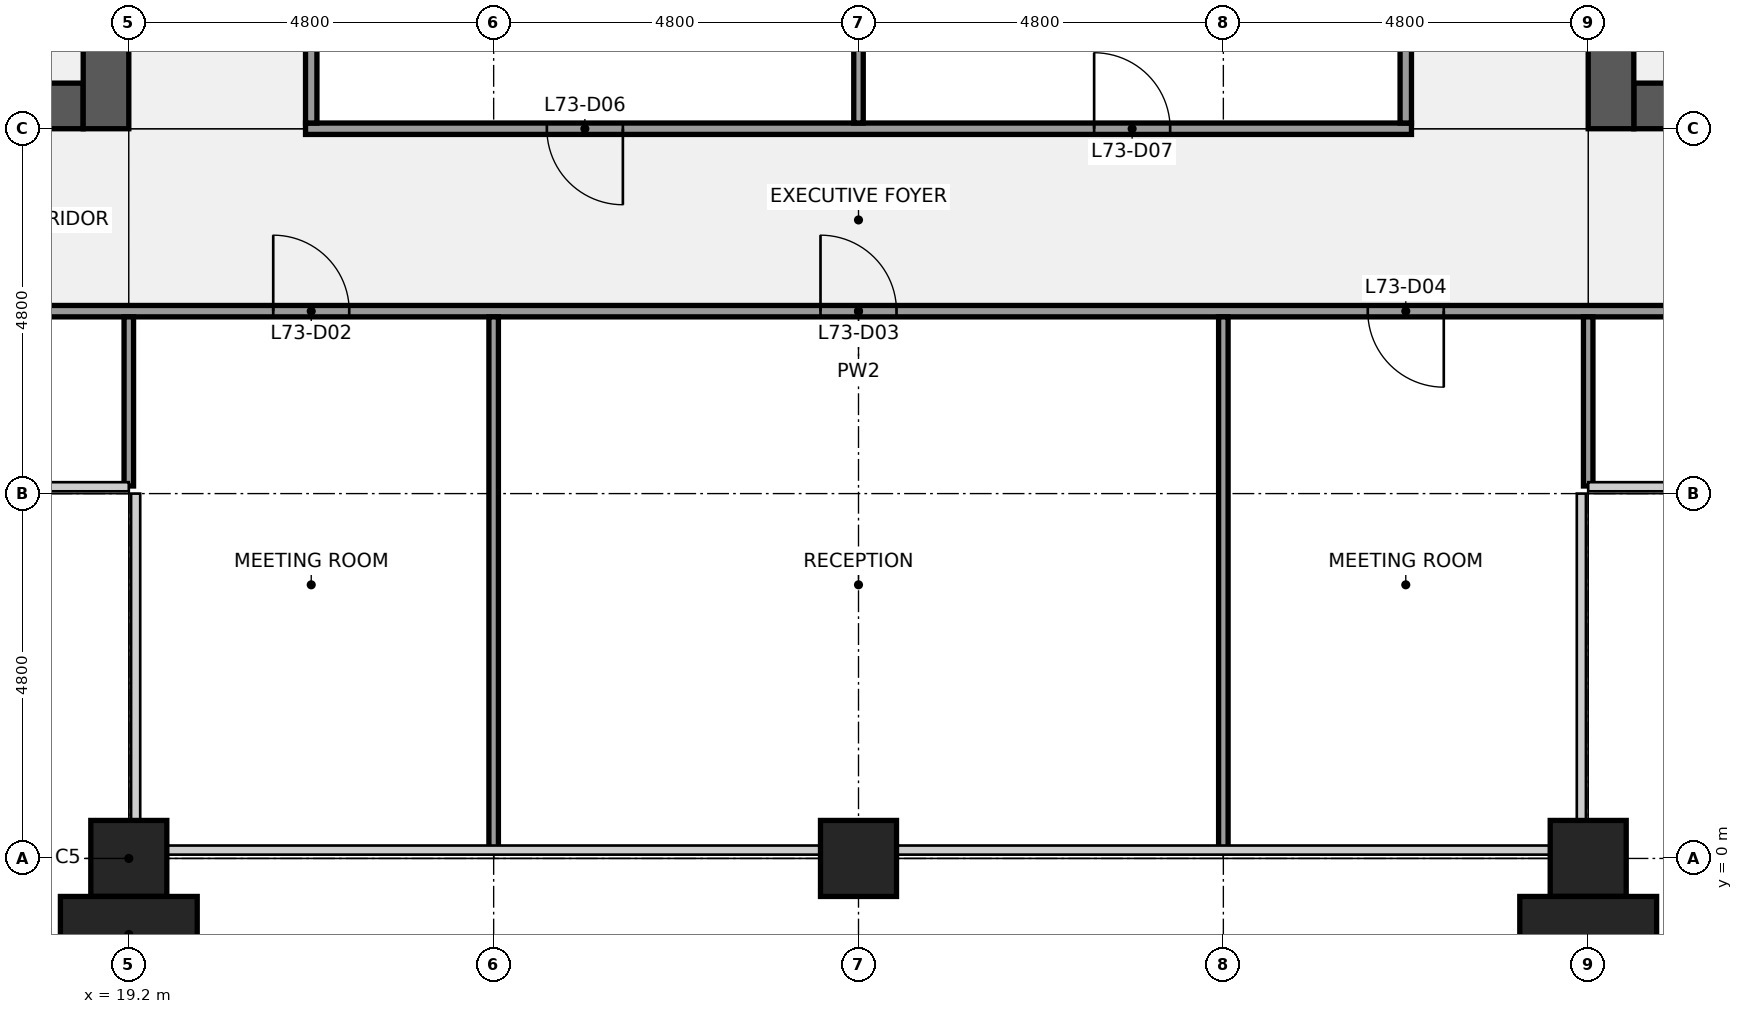
"""IFC4 building model, lengths in metres.
Left out: names, types, materials, properties, quantities, classifications, styles, units other than length and angle.
Written with IfcOpenShell. Run it as: python <this file> out.ifc"""

import sys

from ifc_helpers import new_model, si_unit, direction, frame, frame_2d, origin, origin_2d, place, context, subcontext, project, spatial, rectangle, extrude, element, fill, save


model = new_model("IFC4")
c1 = context("Model", 3, precision=1e-05, world=origin(), true_north=direction((0.0, 1.0)))
c2 = subcontext(c1, "Body", "Model", "MODEL_VIEW")
j1 = project(units=[si_unit("LENGTHUNIT", "METRE"), si_unit("PLANEANGLEUNIT", "RADIAN")], contexts=[c1])
p1 = place(None, origin())
s1 = spatial("IfcSite", under=j1, at=p1, CompositionType="ELEMENT")
p2 = place(p1, origin())
s2 = spatial("IfcBuilding", under=s1, at=p2, CompositionType="ELEMENT")
p3 = place(p2, frame((0.0, 0.0, 330.3)))
s3 = spatial("IfcBuildingStorey", under=s2, at=p3, CompositionType="ELEMENT", Elevation=330.3)
for number, where, z_axis, x_axis in (
    (1, (19.2, 0.0, 0.0), (0.0, 0.0, 1.0), (1.0, 0.0, 0.0)),
    (2, (28.8, 0.0, 0.0), (0.0, 0.0, 1.0), (1.0, 0.0, 0.0)),
    (3, (38.4, 0.0, 0.0), (0.0, 0.0, 1.0), (1.0, 0.0, 0.0)),
):
    element("IfcColumn", number, at=place(p3, frame(where, z_axis=z_axis, x_axis=x_axis)), inside=s3, PredefinedType="COLUMN", context=c2, shape_type="SweptSolid", body=[
        extrude(rectangle(XDim=1.0, YDim=1.0, at=origin_2d()), origin(), (0.0, 0.0, 1.0), 4.0),
    ])
p4 = place(p3, frame((18.6, 9.9, 0.0), z_axis=(0.0, 0.0, 1.0), x_axis=(-1.0, 0.0, 0.0)))
e4 = element("IfcWall", 4, at=p4, inside=s3, PredefinedType="SHEAR", context=c2, shape_type="SweptSolid", body=[
    extrude(rectangle(XDim=4.2, YDim=0.6, at=frame_2d((2.1, 0.0))), origin(), (0.0, 0.0, 1.0), 3.84),
])
p5 = place(p4, frame((1.25, 0.0, 0.0)))
e5 = element("IfcOpeningElement", 5, at=p5, cuts=e4, PredefinedType="OPENING", context=c2, shape_type="SweptSolid", body=[
    extrude(rectangle(XDim=1.1, YDim=2.1, at=frame_2d((0.55, 1.05))), frame((0.0, 0.31, 0.0), z_axis=(0.0, -1.0, 0.0), x_axis=(1.0, 0.0, 0.0)), (0.0, 0.0, 1.0), 0.62),
])
p6 = place(p3, frame((18.9, 38.4, 0.0), z_axis=(0.0, 0.0, 1.0), x_axis=(0.0, -1.0, 0.0)))
e6 = element("IfcWall", 6, at=p6, inside=s3, PredefinedType="SHEAR", context=c2, shape_type="SweptSolid", body=[
    extrude(rectangle(XDim=28.8, YDim=0.6, at=frame_2d((14.4, 0.0))), origin(), (0.0, 0.0, 1.0), 3.84),
])
p7 = place(p6, frame((18.3, 0.0, 0.0)))
e7 = element("IfcOpeningElement", 7, at=p7, cuts=e6, PredefinedType="OPENING", context=c2, shape_type="SweptSolid", body=[
    extrude(rectangle(XDim=1.8, YDim=2.1, at=frame_2d((0.9, 1.05))), frame((0.0, 0.31, 0.0), z_axis=(0.0, -1.0, 0.0), x_axis=(1.0, 0.0, 0.0)), (0.0, 0.0, 1.0), 0.62),
])
p8 = place(p6, frame((8.7, 0.0, 0.0)))
e8 = element("IfcOpeningElement", 8, at=p8, cuts=e6, PredefinedType="OPENING", context=c2, shape_type="SweptSolid", body=[
    extrude(rectangle(XDim=1.8, YDim=2.1, at=frame_2d((0.9, 1.05))), frame((0.0, 0.31, 0.0), z_axis=(0.0, -1.0, 0.0), x_axis=(1.0, 0.0, 0.0)), (0.0, 0.0, 1.0), 0.62),
])
p9 = place(p3, frame((43.2, 9.9, 0.0), z_axis=(0.0, 0.0, 1.0), x_axis=(-1.0, 0.0, 0.0)))
e9 = element("IfcWall", 9, at=p9, inside=s3, PredefinedType="SHEAR", context=c2, shape_type="SweptSolid", body=[
    extrude(rectangle(XDim=4.2, YDim=0.6, at=frame_2d((2.1, 0.0))), origin(), (0.0, 0.0, 1.0), 3.84),
])
p10 = place(p9, frame((1.85, 0.0, 0.0)))
e10 = element("IfcOpeningElement", 10, at=p10, cuts=e9, PredefinedType="OPENING", context=c2, shape_type="SweptSolid", body=[
    extrude(rectangle(XDim=1.1, YDim=2.1, at=frame_2d((0.55, 1.05))), frame((0.0, 0.31, 0.0), z_axis=(0.0, -1.0, 0.0), x_axis=(1.0, 0.0, 0.0)), (0.0, 0.0, 1.0), 0.62),
])
p11 = place(p3, frame((38.7, 9.6, 0.0), z_axis=(0.0, 0.0, 1.0), x_axis=(0.0, 1.0, 0.0)))
e11 = element("IfcWall", 11, at=p11, inside=s3, PredefinedType="SHEAR", context=c2, shape_type="SweptSolid", body=[
    extrude(rectangle(XDim=28.8, YDim=0.6, at=frame_2d((14.4, 0.0))), origin(), (0.0, 0.0, 1.0), 3.84),
])
p12 = place(p11, frame((8.7, 0.0, 0.0)))
e12 = element("IfcOpeningElement", 12, at=p12, cuts=e11, PredefinedType="OPENING", context=c2, shape_type="SweptSolid", body=[
    extrude(rectangle(XDim=1.8, YDim=2.1, at=frame_2d((0.9, 1.05))), frame((0.0, 0.31, 0.0), z_axis=(0.0, -1.0, 0.0), x_axis=(1.0, 0.0, 0.0)), (0.0, 0.0, 1.0), 0.62),
])
p13 = place(p11, frame((18.3, 0.0, 0.0)))
e13 = element("IfcOpeningElement", 13, at=p13, cuts=e11, PredefinedType="OPENING", context=c2, shape_type="SweptSolid", body=[
    extrude(rectangle(XDim=1.8, YDim=2.1, at=frame_2d((0.9, 1.05))), frame((0.0, 0.31, 0.0), z_axis=(0.0, -1.0, 0.0), x_axis=(1.0, 0.0, 0.0)), (0.0, 0.0, 1.0), 0.62),
])
p14 = place(p3, frame((14.5, 7.2, 0.0), z_axis=(0.0, 0.0, 1.0), x_axis=(1.0, 0.0, 0.0)))
e14 = element("IfcWall", 14, at=p14, inside=s3, PredefinedType="PARTITIONING", context=c2, shape_type="SweptSolid", body=[
    extrude(rectangle(XDim=28.6, YDim=0.15, at=frame_2d((14.3, 0.0))), origin(), (0.0, 0.0, 1.0), 2.87),
])
p15 = place(p14, frame((1.85, 0.0, 0.0)))
e15 = element("IfcOpeningElement", 15, at=p15, cuts=e14, PredefinedType="OPENING", context=c2, shape_type="SweptSolid", body=[
    extrude(rectangle(XDim=1.0, YDim=2.1, at=frame_2d((0.5, 1.05))), frame((0.0, 0.085, 0.0), z_axis=(0.0, -1.0, 0.0), x_axis=(1.0, 0.0, 0.0)), (0.0, 0.0, 1.0), 0.17),
])
p16 = place(p14, frame((6.6, 0.0, 0.0)))
e16 = element("IfcOpeningElement", 16, at=p16, cuts=e14, PredefinedType="OPENING", context=c2, shape_type="SweptSolid", body=[
    extrude(rectangle(XDim=1.0, YDim=2.1, at=frame_2d((0.5, 1.05))), frame((0.0, 0.085, 0.0), z_axis=(0.0, -1.0, 0.0), x_axis=(1.0, 0.0, 0.0)), (0.0, 0.0, 1.0), 0.17),
])
p17 = place(p14, frame((13.8, 0.0, 0.0)))
e17 = element("IfcOpeningElement", 17, at=p17, cuts=e14, PredefinedType="OPENING", context=c2, shape_type="SweptSolid", body=[
    extrude(rectangle(XDim=1.0, YDim=2.1, at=frame_2d((0.5, 1.05))), frame((0.0, 0.085, 0.0), z_axis=(0.0, -1.0, 0.0), x_axis=(1.0, 0.0, 0.0)), (0.0, 0.0, 1.0), 0.17),
])
p18 = place(p14, frame((21.0, 0.0, 0.0)))
e18 = element("IfcOpeningElement", 18, at=p18, cuts=e14, PredefinedType="OPENING", context=c2, shape_type="SweptSolid", body=[
    extrude(rectangle(XDim=1.0, YDim=2.1, at=frame_2d((0.5, 1.05))), frame((0.0, 0.085, 0.0), z_axis=(0.0, -1.0, 0.0), x_axis=(1.0, 0.0, 0.0)), (0.0, 0.0, 1.0), 0.17),
])
p19 = place(p14, frame((25.75, 0.0, 0.0)))
e19 = element("IfcOpeningElement", 19, at=p19, cuts=e14, PredefinedType="OPENING", context=c2, shape_type="SweptSolid", body=[
    extrude(rectangle(XDim=1.0, YDim=2.1, at=frame_2d((0.5, 1.05))), frame((0.0, 0.085, 0.0), z_axis=(0.0, -1.0, 0.0), x_axis=(1.0, 0.0, 0.0)), (0.0, 0.0, 1.0), 0.17),
])
p20 = place(p3, frame((21.525, 9.6, 0.0), z_axis=(0.0, 0.0, 1.0), x_axis=(1.0, 0.0, 0.0)))
e20 = element("IfcWall", 20, at=p20, inside=s3, PredefinedType="PARTITIONING", context=c2, shape_type="SweptSolid", body=[
    extrude(rectangle(XDim=14.55, YDim=0.15, at=frame_2d((7.275, 0.0))), origin(), (0.0, 0.0, 1.0), 2.87),
])
p21 = place(p20, frame((3.175, 0.0, 0.0)))
e21 = element("IfcOpeningElement", 21, at=p21, cuts=e20, PredefinedType="OPENING", context=c2, shape_type="SweptSolid", body=[
    extrude(rectangle(XDim=1.0, YDim=2.1, at=frame_2d((0.5, 1.05))), frame((0.0, 0.085, 0.0), z_axis=(0.0, -1.0, 0.0), x_axis=(1.0, 0.0, 0.0)), (0.0, 0.0, 1.0), 0.17),
])
p22 = place(p20, frame((10.375, 0.0, 0.0)))
e22 = element("IfcOpeningElement", 22, at=p22, cuts=e20, PredefinedType="OPENING", context=c2, shape_type="SweptSolid", body=[
    extrude(rectangle(XDim=1.0, YDim=2.1, at=frame_2d((0.5, 1.05))), frame((0.0, 0.085, 0.0), z_axis=(0.0, -1.0, 0.0), x_axis=(1.0, 0.0, 0.0)), (0.0, 0.0, 1.0), 0.17),
])
p23 = place(p3, frame((19.2, 4.9, 0.0), z_axis=(0.0, 0.0, 1.0), x_axis=(0.0, 1.0, 0.0)))
e23 = element("IfcWall", 23, at=p23, inside=s3, PredefinedType="PARTITIONING", context=c2, shape_type="SweptSolid", body=[
    extrude(rectangle(XDim=2.225, YDim=0.125, at=frame_2d((1.113, 0.0))), origin(), (0.0, 0.0, 1.0), 2.87),
])
p24 = place(p3, frame((21.6, 9.675, 0.0), z_axis=(0.0, 0.0, 1.0), x_axis=(0.0, 1.0, 0.0)))
e24 = element("IfcWall", 24, at=p24, inside=s3, PredefinedType="PARTITIONING", context=c2, shape_type="SweptSolid", body=[
    extrude(rectangle(XDim=4.65, YDim=0.15, at=frame_2d((2.325, 0.0))), origin(), (0.0, 0.0, 1.0), 2.87),
])
p25 = place(p3, frame((24.0, 0.1, 0.0), z_axis=(0.0, 0.0, 1.0), x_axis=(0.0, 1.0, 0.0)))
e25 = element("IfcWall", 25, at=p25, inside=s3, PredefinedType="PARTITIONING", context=c2, shape_type="SweptSolid", body=[
    extrude(rectangle(XDim=7.025, YDim=0.125, at=frame_2d((3.512, 0.0))), origin(), (0.0, 0.0, 1.0), 2.87),
])
p26 = place(p3, frame((28.8, 9.675, 0.0), z_axis=(0.0, 0.0, 1.0), x_axis=(0.0, 1.0, 0.0)))
e26 = element("IfcWall", 26, at=p26, inside=s3, PredefinedType="PARTITIONING", context=c2, shape_type="SweptSolid", body=[
    extrude(rectangle(XDim=4.662, YDim=0.125, at=frame_2d((2.331, 0.0))), origin(), (0.0, 0.0, 1.0), 2.87),
])
p27 = place(p3, frame((33.6, 0.1, 0.0), z_axis=(0.0, 0.0, 1.0), x_axis=(0.0, 1.0, 0.0)))
e27 = element("IfcWall", 27, at=p27, inside=s3, PredefinedType="PARTITIONING", context=c2, shape_type="SweptSolid", body=[
    extrude(rectangle(XDim=7.025, YDim=0.125, at=frame_2d((3.512, 0.0))), origin(), (0.0, 0.0, 1.0), 2.87),
])
p28 = place(p3, frame((36.0, 9.675, 0.0), z_axis=(0.0, 0.0, 1.0), x_axis=(0.0, 1.0, 0.0)))
e28 = element("IfcWall", 28, at=p28, inside=s3, PredefinedType="PARTITIONING", context=c2, shape_type="SweptSolid", body=[
    extrude(rectangle(XDim=4.65, YDim=0.15, at=frame_2d((2.325, 0.0))), origin(), (0.0, 0.0, 1.0), 2.87),
])
p29 = place(p3, frame((38.4, 4.9, 0.0), z_axis=(0.0, 0.0, 1.0), x_axis=(0.0, 1.0, 0.0)))
e29 = element("IfcWall", 29, at=p29, inside=s3, PredefinedType="PARTITIONING", context=c2, shape_type="SweptSolid", body=[
    extrude(rectangle(XDim=2.225, YDim=0.125, at=frame_2d((1.113, 0.0))), origin(), (0.0, 0.0, 1.0), 2.87),
])
for number, where, z_axis, x_axis in (
    (30, (19.2, -1.0, 0.0), (0.0, 0.0, 1.0), (1.0, 0.0, 0.0)),
    (31, (38.4, -1.0, 0.0), (0.0, 0.0, 1.0), (1.0, 0.0, 0.0)),
):
    element("IfcColumn", number, at=place(p3, frame(where, z_axis=z_axis, x_axis=x_axis)), inside=s3, PredefinedType="PILASTER", context=c2, shape_type="SweptSolid", body=[
        extrude(rectangle(XDim=1.8, YDim=1.0, at=origin_2d()), origin(), (0.0, 0.0, 1.0), 4.0),
    ])
p30 = place(p16, origin())
e32 = element("IfcDoor", 32, at=p30, inside=s3, OperationType="SINGLE_SWING_LEFT", PredefinedType="DOOR", context=c2, shape_type="SweptSolid", body=[
    extrude(rectangle(XDim=1.0, YDim=2.1, at=frame_2d((0.5, 1.05))), frame((0.0, 0.025, 0.0), z_axis=(0.0, -1.0, 0.0), x_axis=(1.0, 0.0, 0.0)), (0.0, 0.0, 1.0), 0.05),
])
fill(e16, e32)
p31 = place(p17, origin())
e33 = element("IfcDoor", 33, at=p31, inside=s3, OperationType="SINGLE_SWING_LEFT", PredefinedType="DOOR", context=c2, shape_type="SweptSolid", body=[
    extrude(rectangle(XDim=1.0, YDim=2.1, at=frame_2d((0.5, 1.05))), frame((0.0, 0.025, 0.0), z_axis=(0.0, -1.0, 0.0), x_axis=(1.0, 0.0, 0.0)), (0.0, 0.0, 1.0), 0.05),
])
fill(e17, e33)
p32 = place(p18, origin())
e34 = element("IfcDoor", 34, at=p32, inside=s3, OperationType="SINGLE_SWING_RIGHT", PredefinedType="DOOR", context=c2, shape_type="SweptSolid", body=[
    extrude(rectangle(XDim=1.0, YDim=2.1, at=frame_2d((0.5, 1.05))), frame((0.0, 0.025, 0.0), z_axis=(0.0, -1.0, 0.0), x_axis=(1.0, 0.0, 0.0)), (0.0, 0.0, 1.0), 0.05),
])
fill(e18, e34)
p33 = place(p21, origin())
e35 = element("IfcDoor", 35, at=p33, inside=s3, OperationType="SINGLE_SWING_RIGHT", PredefinedType="DOOR", context=c2, shape_type="SweptSolid", body=[
    extrude(rectangle(XDim=1.0, YDim=2.1, at=frame_2d((0.5, 1.05))), frame((0.0, 0.025, 0.0), z_axis=(0.0, -1.0, 0.0), x_axis=(1.0, 0.0, 0.0)), (0.0, 0.0, 1.0), 0.05),
])
fill(e21, e35)
p34 = place(p22, origin())
e36 = element("IfcDoor", 36, at=p34, inside=s3, OperationType="SINGLE_SWING_LEFT", PredefinedType="DOOR", context=c2, shape_type="SweptSolid", body=[
    extrude(rectangle(XDim=1.0, YDim=2.1, at=frame_2d((0.5, 1.05))), frame((0.0, 0.025, 0.0), z_axis=(0.0, -1.0, 0.0), x_axis=(1.0, 0.0, 0.0)), (0.0, 0.0, 1.0), 0.05),
])
fill(e22, e36)
save(model, sys.argv[1])
